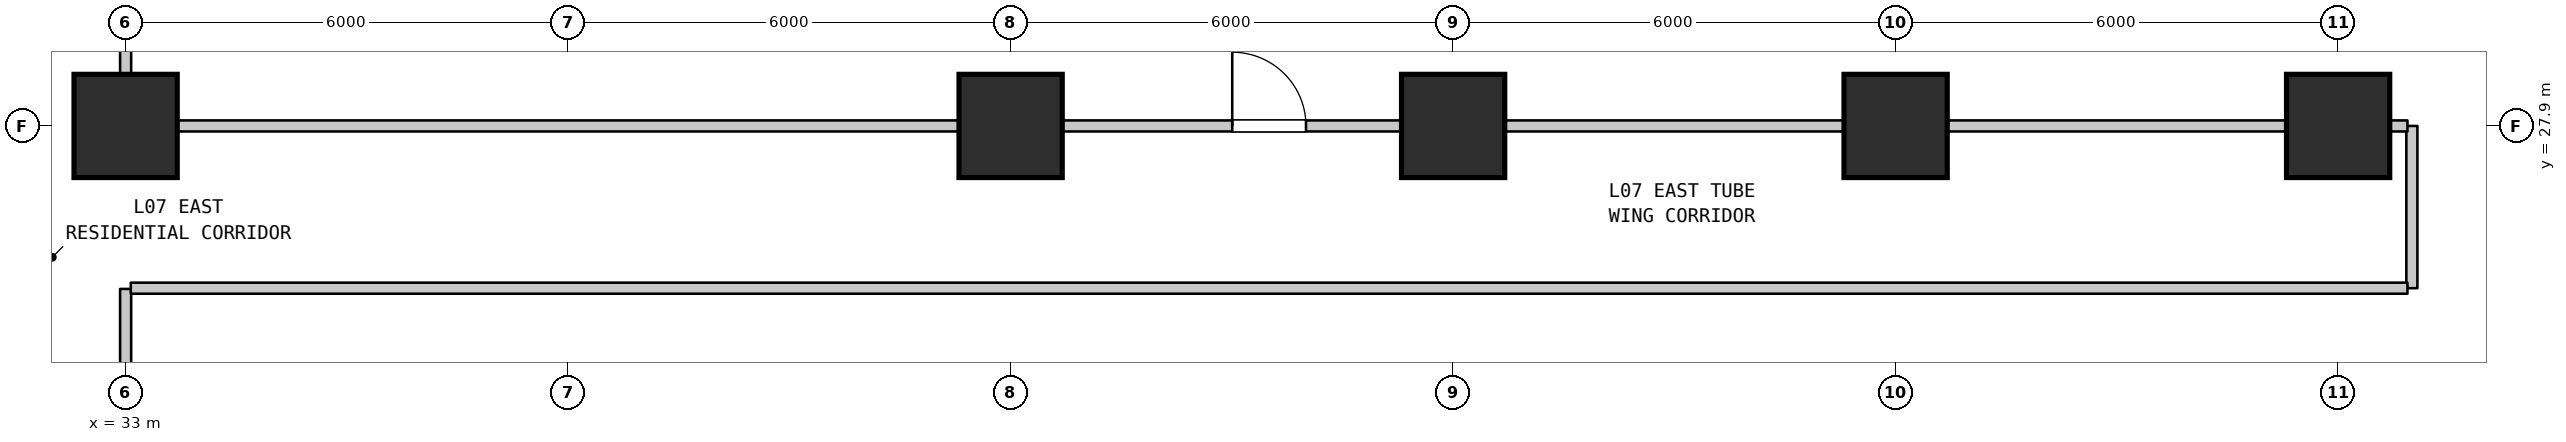
"""IFC4 building model, lengths in metres.
Left out: names, types, materials, properties, quantities, classifications, styles, units other than length and angle.
Written with IfcOpenShell. Run it as: python <this file> out.ifc"""

import sys

from ifc_helpers import new_model, si_unit, direction, frame, frame_2d, origin, origin_2d, place, context, subcontext, project, spatial, rectangle, extrude, element, fill, save


model = new_model("IFC4")
c1 = context("Model", 3, precision=1e-05, world=origin(), true_north=direction((0.0, 1.0)))
c2 = subcontext(c1, "Body", "Model", "MODEL_VIEW")
j1 = project(units=[si_unit("LENGTHUNIT", "METRE"), si_unit("PLANEANGLEUNIT", "RADIAN")], contexts=[c1])
p1 = place(None, origin())
s1 = spatial("IfcSite", under=j1, at=p1, CompositionType="ELEMENT")
p2 = place(p1, origin())
s2 = spatial("IfcBuilding", under=s1, at=p2, CompositionType="ELEMENT")
p3 = place(p2, frame((0.0, 0.0, 35.1)))
s3 = spatial("IfcBuildingStorey", under=s2, at=p3, CompositionType="ELEMENT", Elevation=35.1)
for number, where, z_axis, x_axis in (
    (1, (33.0, 27.9, 0.0), (0.0, 0.0, 1.0), (1.0, 0.0, 0.0)),
    (2, (45.0, 27.9, 0.0), (0.0, 0.0, 1.0), (1.0, 0.0, 0.0)),
    (3, (51.0, 27.9, 0.0), (0.0, 0.0, 1.0), (1.0, 0.0, 0.0)),
    (4, (57.0, 27.9, 0.0), (0.0, 0.0, 1.0), (1.0, 0.0, 0.0)),
    (5, (63.0, 27.9, 0.0), (0.0, 0.0, 1.0), (1.0, 0.0, 0.0)),
):
    element("IfcColumn", number, at=place(p3, frame(where, z_axis=z_axis, x_axis=x_axis)), inside=s3, PredefinedType="COLUMN", context=c2, shape_type="SweptSolid", body=[
        extrude(rectangle(XDim=1.4, YDim=1.4, at=origin_2d()), origin(), (0.0, 0.0, 1.0), 3.7),
    ])
p4 = place(p3, frame((33.0, 19.66, 0.0), z_axis=(0.0, 0.0, 1.0), x_axis=(0.0, 1.0, 0.0)))
e6 = element("IfcWall", 6, at=p4, inside=s3, PredefinedType="STANDARD", context=c2, shape_type="SweptSolid", body=[
    extrude(rectangle(XDim=6.03, YDim=0.15, at=frame_2d((3.015, 0.0))), origin(), (0.0, 0.0, 1.0), 2.885),
])
p5 = place(p3, frame((33.0, 27.91, 0.0), z_axis=(0.0, 0.0, 1.0), x_axis=(0.0, 1.0, 0.0)))
e7 = element("IfcWall", 7, at=p5, inside=s3, PredefinedType="STANDARD", context=c2, shape_type="SweptSolid", body=[
    extrude(rectangle(XDim=9.98, YDim=0.15, at=frame_2d((4.99, 0.0))), origin(), (0.0, 0.0, 1.0), 2.885),
])
p6 = place(p3, frame((64.0, 25.7, 0.0), z_axis=(0.0, 0.0, 1.0), x_axis=(0.0, 1.0, 0.0)))
e8 = element("IfcWall", 8, at=p6, inside=s3, PredefinedType="STANDARD", context=c2, shape_type="SweptSolid", body=[
    extrude(rectangle(XDim=2.2, YDim=0.15, at=frame_2d((1.1, 0.0))), origin(), (0.0, 0.0, 1.0), 3.385),
])
p7 = place(p3, frame((33.07, 25.7, 0.0), z_axis=(0.0, 0.0, 1.0), x_axis=(1.0, 0.0, 0.0)))
e9 = element("IfcWall", 9, at=p7, inside=s3, PredefinedType="STANDARD", context=c2, shape_type="SweptSolid", body=[
    extrude(rectangle(XDim=30.87, YDim=0.15, at=frame_2d((15.435, 0.0))), origin(), (0.0, 0.0, 1.0), 3.385),
])
p8 = place(p3, frame((33.07, 27.9, 0.0), z_axis=(0.0, 0.0, 1.0), x_axis=(1.0, 0.0, 0.0)))
e10 = element("IfcWall", 10, at=p8, inside=s3, PredefinedType="STANDARD", context=c2, shape_type="SweptSolid", body=[
    extrude(rectangle(XDim=30.87, YDim=0.15, at=frame_2d((15.435, 0.0))), origin(), (0.0, 0.0, 1.0), 2.885),
])
p9 = place(p8, frame((14.935, 0.0, 0.0)))
e11 = element("IfcOpeningElement", 11, at=p9, cuts=e10, PredefinedType="OPENING", context=c2, shape_type="SweptSolid", body=[
    extrude(rectangle(XDim=1.0, YDim=2.15, at=frame_2d((0.5, 1.075))), frame((0.0, 0.085, 0.0), z_axis=(0.0, -1.0, 0.0), x_axis=(1.0, 0.0, 0.0)), (0.0, 0.0, 1.0), 0.17),
])
p10 = place(p9, origin())
e12 = element("IfcDoor", 12, at=p10, inside=s3, OperationType="SINGLE_SWING_LEFT", PredefinedType="DOOR", context=c2, shape_type="SweptSolid", body=[
    extrude(rectangle(XDim=1.0, YDim=2.15, at=frame_2d((0.5, 1.075))), frame((0.0, 0.025, 0.0), z_axis=(0.0, -1.0, 0.0), x_axis=(1.0, 0.0, 0.0)), (0.0, 0.0, 1.0), 0.05),
])
fill(e11, e12)
save(model, sys.argv[1])
